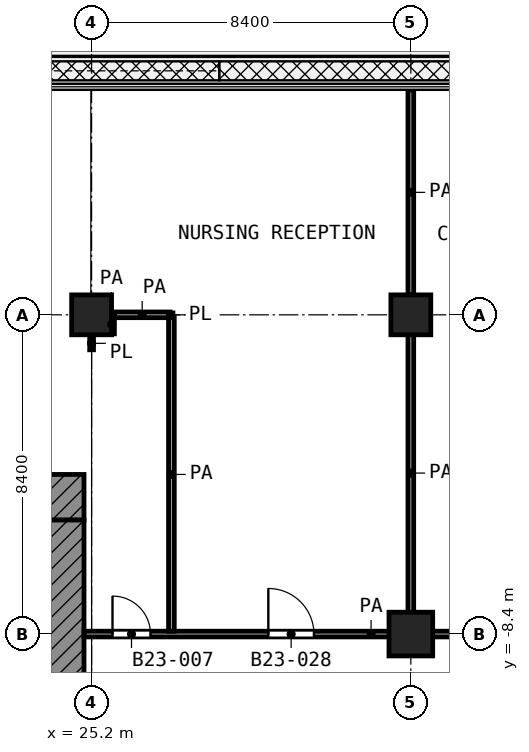
"""IFC4 building model, lengths in metres.
Left out: names, types, materials, properties, quantities, classifications, styles, units other than length and angle.
Written with IfcOpenShell. Run it as: python <this file> out.ifc"""

import sys

from ifc_helpers import new_model, si_unit, direction, frame, frame_2d, origin, origin_2d, place, context, subcontext, project, spatial, rectangle, extrude, element, fill, save


model = new_model("IFC4")
c1 = context("Model", 3, precision=1e-05, world=origin(), true_north=direction((0.0, 1.0)))
c2 = subcontext(c1, "Body", "Model", "MODEL_VIEW")
j1 = project(units=[si_unit("LENGTHUNIT", "METRE"), si_unit("PLANEANGLEUNIT", "RADIAN")], contexts=[c1])
p1 = place(None, origin())
s1 = spatial("IfcSite", under=j1, at=p1, CompositionType="ELEMENT")
p2 = place(p1, origin())
s2 = spatial("IfcBuilding", under=s1, at=p2, CompositionType="ELEMENT")
p3 = place(p2, frame((0.0, 0.0, 103.0)))
s3 = spatial("IfcBuildingStorey", under=s2, at=p3, CompositionType="ELEMENT", Elevation=103.0)
for number, where, z_axis, x_axis in (
    (1, (25.2, 0.0, 0.0), (0.0, 0.0, 1.0), (1.0, 0.0, 0.0)),
    (2, (33.6, 0.0, 0.0), (0.0, 0.0, 1.0), (1.0, 0.0, 0.0)),
):
    element("IfcColumn", number, at=place(p3, frame(where, z_axis=z_axis, x_axis=x_axis)), inside=s3, PredefinedType="COLUMN", context=c2, shape_type="SweptSolid", body=[
        extrude(rectangle(XDim=1.05, YDim=1.05, at=origin_2d()), origin(), (0.0, 0.0, 1.0), 4.2),
    ])
p4 = place(p3, frame((33.6, -8.4, 0.0), z_axis=(0.0, 0.0, 1.0), x_axis=(1.0, 0.0, 0.0)))
e3 = element("IfcColumn", 3, at=p4, inside=s3, PredefinedType="COLUMN", context=c2, shape_type="SweptSolid", body=[
    extrude(rectangle(XDim=1.15, YDim=1.15, at=origin_2d()), origin(), (0.0, 0.0, 1.0), 4.2),
])
p5 = place(p3, frame((4.2, -4.8, 0.0), z_axis=(0.0, 0.0, 1.0), x_axis=(1.0, 0.0, 0.0)))
e4 = element("IfcWall", 4, at=p5, inside=s3, PredefinedType="SHEAR", context=c2, shape_type="SweptSolid", body=[
    extrude(rectangle(XDim=20.8, YDim=1.2, at=frame_2d((10.4, 0.0))), origin(), (0.0, 0.0, 1.0), 3.6),
])
p6 = place(p5, frame((1.95, 0.0, 0.0)))
e5 = element("IfcOpeningElement", 5, at=p6, cuts=e4, PredefinedType="OPENING", context=c2, shape_type="SweptSolid", body=[
    extrude(rectangle(XDim=1.1, YDim=2.1, at=frame_2d((0.55, 1.05))), frame((0.0, 0.61, 0.0), z_axis=(0.0, -1.0, 0.0), x_axis=(1.0, 0.0, 0.0)), (0.0, 0.0, 1.0), 1.22),
])
p7 = place(p5, frame((17.95, 0.0, 0.0)))
e6 = element("IfcOpeningElement", 6, at=p7, cuts=e4, PredefinedType="OPENING", context=c2, shape_type="SweptSolid", body=[
    extrude(rectangle(XDim=1.1, YDim=2.1, at=frame_2d((0.55, 1.05))), frame((0.0, 0.61, 0.0), z_axis=(0.0, -1.0, 0.0), x_axis=(1.0, 0.0, 0.0)), (0.0, 0.0, 1.0), 1.22),
])
p8 = place(p3, frame((24.5, -24.0, 0.0), z_axis=(0.0, 0.0, 1.0), x_axis=(0.0, 1.0, 0.0)))
e7 = element("IfcWall", 7, at=p8, inside=s3, PredefinedType="SHEAR", context=c2, shape_type="SweptSolid", body=[
    extrude(rectangle(XDim=18.6, YDim=1.0, at=frame_2d((9.3, 0.0))), origin(), (0.0, 0.0, 1.0), 3.6),
])
p9 = place(p8, frame((10.5, 0.0, 0.0)))
e8 = element("IfcOpeningElement", 8, at=p9, cuts=e7, PredefinedType="OPENING", context=c2, shape_type="SweptSolid", body=[
    extrude(rectangle(XDim=1.8, YDim=2.1, at=frame_2d((0.9, 1.05))), frame((0.0, 0.51, 0.0), z_axis=(0.0, -1.0, 0.0), x_axis=(1.0, 0.0, 0.0)), (0.0, 0.0, 1.0), 1.02),
])
p10 = place(p3, frame((27.22, 0.0, 0.0), z_axis=(0.0, 0.0, 1.0), x_axis=(1.0, 0.0, 0.0)))
e9 = element("IfcWall", 9, at=p10, inside=s3, PredefinedType="PARTITIONING", context=c2, shape_type="SweptSolid", body=[
    extrude(rectangle(XDim=0.12, YDim=0.1, at=frame_2d((0.06, 0.0))), origin(), (0.0, 0.0, 1.0), 3.6),
])
p11 = place(p3, frame((25.2, -0.92, 0.0), z_axis=(0.0, 0.0, 1.0), x_axis=(0.0, 1.0, 0.0)))
e10 = element("IfcWall", 10, at=p11, inside=s3, PredefinedType="PARTITIONING", context=c2, shape_type="SweptSolid", body=[
    extrude(rectangle(XDim=0.34, YDim=0.1, at=frame_2d((0.17, 0.0))), origin(), (0.0, 0.0, 1.0), 3.6),
])
p12 = place(p3, frame((25.0, -8.4, 0.0), z_axis=(0.0, 0.0, 1.0), x_axis=(1.0, 0.0, 0.0)))
e11 = element("IfcWall", 11, at=p12, inside=s3, PredefinedType="PARTITIONING", context=c2, shape_type="SweptSolid", body=[
    extrude(rectangle(XDim=15.107, YDim=0.15, at=frame_2d((7.553, 0.0))), origin(), (0.0, 0.0, 1.0), 3.6),
])
p13 = place(p12, frame((10.2, 0.0, 0.0)))
e12 = element("IfcOpeningElement", 12, at=p13, cuts=e11, PredefinedType="OPENING", context=c2, shape_type="SweptSolid", body=[
    extrude(rectangle(XDim=1.0, YDim=2.1, at=frame_2d((0.5, 1.05))), frame((0.0, 0.085, 0.0), z_axis=(0.0, -1.0, 0.0), x_axis=(1.0, 0.0, 0.0)), (0.0, 0.0, 1.0), 0.17),
])
p14 = place(p12, frame((0.75, 0.0, 0.0)))
e13 = element("IfcOpeningElement", 13, at=p14, cuts=e11, PredefinedType="OPENING", context=c2, shape_type="SweptSolid", body=[
    extrude(rectangle(XDim=1.0, YDim=2.1, at=frame_2d((0.5, 1.05))), frame((0.0, 0.085, 0.0), z_axis=(0.0, -1.0, 0.0), x_axis=(1.0, 0.0, 0.0)), (0.0, 0.0, 1.0), 0.17),
])
p15 = place(p12, frame((4.85, 0.0, 0.0)))
e14 = element("IfcOpeningElement", 14, at=p15, cuts=e11, PredefinedType="OPENING", context=c2, shape_type="SweptSolid", body=[
    extrude(rectangle(XDim=1.2, YDim=2.1, at=frame_2d((0.6, 1.05))), frame((0.0, 0.085, 0.0), z_axis=(0.0, -1.0, 0.0), x_axis=(1.0, 0.0, 0.0)), (0.0, 0.0, 1.0), 0.17),
])
p16 = place(p3, frame((25.802, 0.0, 0.0), z_axis=(0.0, 0.0, 1.0), x_axis=(1.0, 0.0, 0.0)))
e15 = element("IfcWall", 15, at=p16, inside=s3, PredefinedType="PARTITIONING", context=c2, shape_type="SweptSolid", body=[
    extrude(rectangle(XDim=1.458, YDim=0.15, at=frame_2d((0.729, 0.0))), origin(), (0.0, 0.0, 1.0), 3.6),
])
p17 = place(p3, frame((25.725, -0.5, 0.0), z_axis=(0.0, 0.0, 1.0), x_axis=(0.0, 1.0, 0.0)))
e16 = element("IfcWall", 16, at=p17, inside=s3, PredefinedType="PARTITIONING", context=c2, shape_type="SweptSolid", body=[
    extrude(rectangle(XDim=0.498, YDim=0.15, at=frame_2d((0.249, 0.0))), origin(), (0.0, 0.0, 1.0), 3.6),
])
p18 = place(p3, frame((27.3, -8.325, 0.0), z_axis=(0.0, 0.0, 1.0), x_axis=(0.0, 1.0, 0.0)))
e17 = element("IfcWall", 17, at=p18, inside=s3, PredefinedType="PARTITIONING", context=c2, shape_type="SweptSolid", body=[
    extrude(rectangle(XDim=8.25, YDim=0.15, at=frame_2d((4.125, 0.0))), origin(), (0.0, 0.0, 1.0), 3.6),
])
p19 = place(p3, frame((33.6, -8.325, 0.0), z_axis=(0.0, 0.0, 1.0), x_axis=(0.0, 1.0, 0.0)))
e18 = element("IfcWall", 18, at=p19, inside=s3, PredefinedType="PARTITIONING", context=c2, shape_type="SweptSolid", body=[
    extrude(rectangle(XDim=8.322, YDim=0.15, at=frame_2d((4.161, 0.0))), origin(), (0.0, 0.0, 1.0), 3.6),
])
p20 = place(p3, frame((33.6, 0.525, 0.0), z_axis=(0.0, 0.0, 1.0), x_axis=(0.0, 1.0, 0.0)))
e19 = element("IfcWall", 19, at=p20, inside=s3, PredefinedType="PARTITIONING", context=c2, shape_type="SweptSolid", body=[
    extrude(rectangle(XDim=5.395, YDim=0.15, at=frame_2d((2.698, 0.0))), origin(), (0.0, 0.0, 1.0), 3.6),
])
p21 = place(p14, origin())
e20 = element("IfcDoor", 20, at=p21, inside=s3, OperationType="SINGLE_SWING_LEFT", PredefinedType="DOOR", context=c2, shape_type="SweptSolid", body=[
    extrude(rectangle(XDim=1.0, YDim=2.1, at=frame_2d((0.5, 1.05))), frame((0.0, 0.025, 0.0), z_axis=(0.0, -1.0, 0.0), x_axis=(1.0, 0.0, 0.0)), (0.0, 0.0, 1.0), 0.05),
])
fill(e13, e20)
p22 = place(p15, origin())
e21 = element("IfcDoor", 21, at=p22, inside=s3, OperationType="SINGLE_SWING_LEFT", PredefinedType="DOOR", context=c2, shape_type="SweptSolid", body=[
    extrude(rectangle(XDim=1.2, YDim=2.1, at=frame_2d((0.6, 1.05))), frame((0.0, 0.025, 0.0), z_axis=(0.0, -1.0, 0.0), x_axis=(1.0, 0.0, 0.0)), (0.0, 0.0, 1.0), 0.05),
])
fill(e14, e21)
save(model, sys.argv[1])
